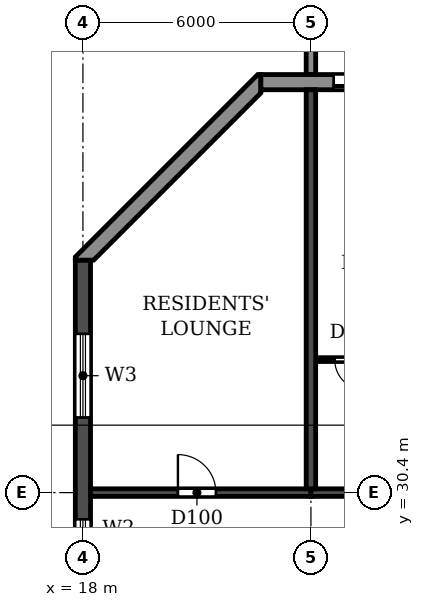
"""IFC4 building model, lengths in metres.
Left out: names, types, materials, properties, quantities, classifications, styles, units other than length and angle.
Written with IfcOpenShell. Run it as: python <this file> out.ifc"""

import sys

from ifc_helpers import new_model, si_unit, direction, frame, frame_2d, origin, place, context, subcontext, project, spatial, polyline, rectangle, outline, extrude, source, transform, mapped, element, fill, save


model = new_model("IFC4")
c1 = context("Model", 3, precision=1e-05, world=origin(), true_north=direction((0.0, 1.0)))
c2 = subcontext(c1, "Body", "Model", "MODEL_VIEW")
j1 = project(units=[si_unit("LENGTHUNIT", "METRE"), si_unit("PLANEANGLEUNIT", "RADIAN")], contexts=[c1])
p1 = place(None, origin())
s1 = spatial("IfcSite", under=j1, at=p1, CompositionType="ELEMENT")
p2 = place(p1, origin())
s2 = spatial("IfcBuilding", under=s1, at=p2, CompositionType="ELEMENT")
p3 = place(p2, frame((0.0, 0.0, 241.2)))
s3 = spatial("IfcBuildingStorey", under=s2, at=p3, CompositionType="ELEMENT", Elevation=241.2)
p4 = place(p3, frame((24.0, 30.5, 0.0), z_axis=(0.0, 0.0, 1.0), x_axis=(0.0, 1.0, 0.0)))
e1 = element("IfcWall", 1, at=p4, inside=s3, PredefinedType="SHEAR", context=c2, shape_type="SweptSolid", body=[
    extrude(rectangle(XDim=10.5, YDim=0.25, at=frame_2d((5.25, 0.0))), origin(), (0.0, 0.0, 1.0), 3.08),
])
p5 = place(p3, frame((18.0, 4.683, 0.0), z_axis=(0.0, 0.0, 1.0), x_axis=(0.0, 1.0, 0.0)))
e2 = element("IfcWall", 2, at=p5, inside=s3, PredefinedType="SHEAR", context=c2, shape_type="SweptSolid", body=[
    extrude(rectangle(XDim=31.834, YDim=0.4, at=frame_2d((15.917, 0.0))), origin(), (0.0, 0.0, 1.0), 3.08),
])
p6 = place(p5, frame((23.817, 0.0, 0.9)))
e3 = element("IfcOpeningElement", 3, at=p6, cuts=e2, PredefinedType="OPENING", context=c2, shape_type="SweptSolid", body=[
    extrude(rectangle(XDim=1.2, YDim=1.5, at=frame_2d((0.6, 0.75))), frame((0.0, 0.21, 0.0), z_axis=(0.0, -1.0, 0.0), x_axis=(1.0, 0.0, 0.0)), (0.0, 0.0, 1.0), 0.42),
])
p7 = place(p5, frame((8.017, 0.0, 0.9)))
e4 = element("IfcOpeningElement", 4, at=p7, cuts=e2, PredefinedType="OPENING", context=c2, shape_type="SweptSolid", body=[
    extrude(rectangle(XDim=1.2, YDim=1.5, at=frame_2d((0.6, 0.75))), frame((0.0, 0.21, 0.0), z_axis=(0.0, -1.0, 0.0), x_axis=(1.0, 0.0, 0.0)), (0.0, 0.0, 1.0), 0.42),
])
p8 = place(p5, frame((27.694, 0.0, 0.6)))
e5 = element("IfcOpeningElement", 5, at=p8, cuts=e2, PredefinedType="OPENING", context=c2, shape_type="SweptSolid", body=[
    extrude(rectangle(XDim=2.2, YDim=1.8, at=frame_2d((1.1, 0.9))), frame((0.0, 0.21, 0.0), z_axis=(0.0, -1.0, 0.0), x_axis=(1.0, 0.0, 0.0)), (0.0, 0.0, 1.0), 0.42),
])
p9 = place(p5, frame((2.541, 0.0, 0.6)))
e6 = element("IfcOpeningElement", 6, at=p9, cuts=e2, PredefinedType="OPENING", context=c2, shape_type="SweptSolid", body=[
    extrude(rectangle(XDim=2.2, YDim=1.8, at=frame_2d((1.1, 0.9))), frame((0.0, 0.21, 0.0), z_axis=(0.0, -1.0, 0.0), x_axis=(1.0, 0.0, 0.0)), (0.0, 0.0, 1.0), 0.42),
])
p10 = place(p5, frame((15.917, 0.0, 0.9)))
e7 = element("IfcOpeningElement", 7, at=p10, cuts=e2, PredefinedType="OPENING", context=c2, shape_type="SweptSolid", body=[
    extrude(rectangle(XDim=1.2, YDim=1.5, at=frame_2d((0.6, 0.75))), frame((0.0, 0.21, 0.0), z_axis=(0.0, -1.0, 0.0), x_axis=(1.0, 0.0, 0.0)), (0.0, 0.0, 1.0), 0.42),
])
p11 = place(p3, frame((18.2, 30.4, 0.0), z_axis=(0.0, 0.0, 1.0), x_axis=(1.0, 0.0, 0.0)))
e8 = element("IfcWall", 8, at=p11, inside=s3, PredefinedType="SHEAR", context=c2, shape_type="SweptSolid", body=[
    extrude(rectangle(XDim=5.8, YDim=0.2, at=frame_2d((2.9, 0.0))), origin(), (0.0, 0.0, 1.0), 2.48),
])
p12 = place(p11, frame((2.3, 0.0, 0.0)))
e9 = element("IfcOpeningElement", 9, at=p12, cuts=e8, PredefinedType="OPENING", context=c2, shape_type="SweptSolid", body=[
    extrude(rectangle(XDim=1.0, YDim=2.1, at=frame_2d((0.5, 1.05))), frame((0.0, 0.11, 0.0), z_axis=(0.0, -1.0, 0.0), x_axis=(1.0, 0.0, 0.0)), (0.0, 0.0, 1.0), 0.22),
])
p13 = place(p3, frame((24.0, 30.4, 0.0), z_axis=(0.0, 0.0, 1.0), x_axis=(1.0, 0.0, 0.0)))
e10 = element("IfcWall", 10, at=p13, inside=s3, PredefinedType="SHEAR", context=c2, shape_type="SweptSolid", body=[
    extrude(rectangle(XDim=6.0, YDim=0.2, at=frame_2d((3.0, 0.0))), origin(), (0.0, 0.0, 1.0), 2.48),
])
p14 = place(p13, frame((2.45, 0.0, 0.0)))
e11 = element("IfcOpeningElement", 11, at=p14, cuts=e10, PredefinedType="OPENING", context=c2, shape_type="SweptSolid", body=[
    extrude(rectangle(XDim=1.0, YDim=2.1, at=frame_2d((0.5, 1.05))), frame((0.0, 0.11, 0.0), z_axis=(0.0, -1.0, 0.0), x_axis=(1.0, 0.0, 0.0)), (0.0, 0.0, 1.0), 0.22),
])
p15 = place(p3, frame((79.317, 41.2, 0.0), z_axis=(0.0, 0.0, 1.0), x_axis=(-1.0, 0.0, 0.0)))
e12 = element("IfcWall", 12, at=p15, inside=s3, PredefinedType="STANDARD", context=c2, shape_type="SweptSolid", body=[
    extrude(rectangle(XDim=56.634, YDim=0.4, at=frame_2d((28.317, 0.0))), origin(), (0.0, 0.0, 1.0), 3.08),
])
p16 = place(p15, frame((52.917, 0.0, 0.0)))
e13 = element("IfcOpeningElement", 13, at=p16, cuts=e12, PredefinedType="OPENING", context=c2, shape_type="SweptSolid", body=[
    extrude(rectangle(XDim=1.8, YDim=2.4, at=frame_2d((0.9, 1.2))), frame((0.0, 0.21, 0.0), z_axis=(0.0, -1.0, 0.0), x_axis=(1.0, 0.0, 0.0)), (0.0, 0.0, 1.0), 0.42),
])
p17 = place(p15, frame((49.717, 0.0, 0.9)))
e14 = element("IfcOpeningElement", 14, at=p17, cuts=e12, PredefinedType="OPENING", context=c2, shape_type="SweptSolid", body=[
    extrude(rectangle(XDim=2.2, YDim=1.5, at=frame_2d((1.1, 0.75))), frame((0.0, 0.21, 0.0), z_axis=(0.0, -1.0, 0.0), x_axis=(1.0, 0.0, 0.0)), (0.0, 0.0, 1.0), 0.42),
])
p18 = place(p15, frame((46.717, 0.0, 0.9)))
e15 = element("IfcOpeningElement", 15, at=p18, cuts=e12, PredefinedType="OPENING", context=c2, shape_type="SweptSolid", body=[
    extrude(rectangle(XDim=2.2, YDim=1.5, at=frame_2d((1.1, 0.75))), frame((0.0, 0.21, 0.0), z_axis=(0.0, -1.0, 0.0), x_axis=(1.0, 0.0, 0.0)), (0.0, 0.0, 1.0), 0.42),
])
p19 = place(p15, frame((43.717, 0.0, 0.9)))
e16 = element("IfcOpeningElement", 16, at=p19, cuts=e12, PredefinedType="OPENING", context=c2, shape_type="SweptSolid", body=[
    extrude(rectangle(XDim=2.2, YDim=1.5, at=frame_2d((1.1, 0.75))), frame((0.0, 0.21, 0.0), z_axis=(0.0, -1.0, 0.0), x_axis=(1.0, 0.0, 0.0)), (0.0, 0.0, 1.0), 0.42),
])
p20 = place(p15, frame((40.917, 0.0, 0.0)))
e17 = element("IfcOpeningElement", 17, at=p20, cuts=e12, PredefinedType="OPENING", context=c2, shape_type="SweptSolid", body=[
    extrude(rectangle(XDim=1.8, YDim=2.4, at=frame_2d((0.9, 1.2))), frame((0.0, 0.21, 0.0), z_axis=(0.0, -1.0, 0.0), x_axis=(1.0, 0.0, 0.0)), (0.0, 0.0, 1.0), 0.42),
])
p21 = place(p15, frame((37.717, 0.0, 0.9)))
e18 = element("IfcOpeningElement", 18, at=p21, cuts=e12, PredefinedType="OPENING", context=c2, shape_type="SweptSolid", body=[
    extrude(rectangle(XDim=2.2, YDim=1.5, at=frame_2d((1.1, 0.75))), frame((0.0, 0.21, 0.0), z_axis=(0.0, -1.0, 0.0), x_axis=(1.0, 0.0, 0.0)), (0.0, 0.0, 1.0), 0.42),
])
p22 = place(p15, frame((34.717, 0.0, 0.9)))
e19 = element("IfcOpeningElement", 19, at=p22, cuts=e12, PredefinedType="OPENING", context=c2, shape_type="SweptSolid", body=[
    extrude(rectangle(XDim=2.2, YDim=1.5, at=frame_2d((1.1, 0.75))), frame((0.0, 0.21, 0.0), z_axis=(0.0, -1.0, 0.0), x_axis=(1.0, 0.0, 0.0)), (0.0, 0.0, 1.0), 0.42),
])
p23 = place(p15, frame((31.717, 0.0, 0.9)))
e20 = element("IfcOpeningElement", 20, at=p23, cuts=e12, PredefinedType="OPENING", context=c2, shape_type="SweptSolid", body=[
    extrude(rectangle(XDim=2.2, YDim=1.5, at=frame_2d((1.1, 0.75))), frame((0.0, 0.21, 0.0), z_axis=(0.0, -1.0, 0.0), x_axis=(1.0, 0.0, 0.0)), (0.0, 0.0, 1.0), 0.42),
])
p24 = place(p15, frame((28.717, 0.0, 0.9)))
e21 = element("IfcOpeningElement", 21, at=p24, cuts=e12, PredefinedType="OPENING", context=c2, shape_type="SweptSolid", body=[
    extrude(rectangle(XDim=2.2, YDim=1.5, at=frame_2d((1.1, 0.75))), frame((0.0, 0.21, 0.0), z_axis=(0.0, -1.0, 0.0), x_axis=(1.0, 0.0, 0.0)), (0.0, 0.0, 1.0), 0.42),
])
p25 = place(p15, frame((25.917, 0.0, 0.0)))
e22 = element("IfcOpeningElement", 22, at=p25, cuts=e12, PredefinedType="OPENING", context=c2, shape_type="SweptSolid", body=[
    extrude(rectangle(XDim=1.8, YDim=2.4, at=frame_2d((0.9, 1.2))), frame((0.0, 0.21, 0.0), z_axis=(0.0, -1.0, 0.0), x_axis=(1.0, 0.0, 0.0)), (0.0, 0.0, 1.0), 0.42),
])
p26 = place(p15, frame((22.717, 0.0, 0.9)))
e23 = element("IfcOpeningElement", 23, at=p26, cuts=e12, PredefinedType="OPENING", context=c2, shape_type="SweptSolid", body=[
    extrude(rectangle(XDim=2.2, YDim=1.5, at=frame_2d((1.1, 0.75))), frame((0.0, 0.21, 0.0), z_axis=(0.0, -1.0, 0.0), x_axis=(1.0, 0.0, 0.0)), (0.0, 0.0, 1.0), 0.42),
])
p27 = place(p15, frame((19.717, 0.0, 0.9)))
e24 = element("IfcOpeningElement", 24, at=p27, cuts=e12, PredefinedType="OPENING", context=c2, shape_type="SweptSolid", body=[
    extrude(rectangle(XDim=2.2, YDim=1.5, at=frame_2d((1.1, 0.75))), frame((0.0, 0.21, 0.0), z_axis=(0.0, -1.0, 0.0), x_axis=(1.0, 0.0, 0.0)), (0.0, 0.0, 1.0), 0.42),
])
p28 = place(p15, frame((16.717, 0.0, 0.9)))
e25 = element("IfcOpeningElement", 25, at=p28, cuts=e12, PredefinedType="OPENING", context=c2, shape_type="SweptSolid", body=[
    extrude(rectangle(XDim=2.2, YDim=1.5, at=frame_2d((1.1, 0.75))), frame((0.0, 0.21, 0.0), z_axis=(0.0, -1.0, 0.0), x_axis=(1.0, 0.0, 0.0)), (0.0, 0.0, 1.0), 0.42),
])
p29 = place(p15, frame((13.917, 0.0, 0.0)))
e26 = element("IfcOpeningElement", 26, at=p29, cuts=e12, PredefinedType="OPENING", context=c2, shape_type="SweptSolid", body=[
    extrude(rectangle(XDim=1.8, YDim=2.4, at=frame_2d((0.9, 1.2))), frame((0.0, 0.21, 0.0), z_axis=(0.0, -1.0, 0.0), x_axis=(1.0, 0.0, 0.0)), (0.0, 0.0, 1.0), 0.42),
])
p30 = place(p15, frame((10.717, 0.0, 0.9)))
e27 = element("IfcOpeningElement", 27, at=p30, cuts=e12, PredefinedType="OPENING", context=c2, shape_type="SweptSolid", body=[
    extrude(rectangle(XDim=2.2, YDim=1.5, at=frame_2d((1.1, 0.75))), frame((0.0, 0.21, 0.0), z_axis=(0.0, -1.0, 0.0), x_axis=(1.0, 0.0, 0.0)), (0.0, 0.0, 1.0), 0.42),
])
p31 = place(p15, frame((7.917, 0.0, 0.0)))
e28 = element("IfcOpeningElement", 28, at=p31, cuts=e12, PredefinedType="OPENING", context=c2, shape_type="SweptSolid", body=[
    extrude(rectangle(XDim=1.8, YDim=2.4, at=frame_2d((0.9, 1.2))), frame((0.0, 0.21, 0.0), z_axis=(0.0, -1.0, 0.0), x_axis=(1.0, 0.0, 0.0)), (0.0, 0.0, 1.0), 0.42),
])
p32 = place(p15, frame((4.717, 0.0, 0.9)))
e29 = element("IfcOpeningElement", 29, at=p32, cuts=e12, PredefinedType="OPENING", context=c2, shape_type="SweptSolid", body=[
    extrude(rectangle(XDim=2.2, YDim=1.5, at=frame_2d((1.1, 0.75))), frame((0.0, 0.21, 0.0), z_axis=(0.0, -1.0, 0.0), x_axis=(1.0, 0.0, 0.0)), (0.0, 0.0, 1.0), 0.42),
])
p33 = place(p15, frame((1.917, 0.0, 0.0)))
e30 = element("IfcOpeningElement", 30, at=p33, cuts=e12, PredefinedType="OPENING", context=c2, shape_type="SweptSolid", body=[
    extrude(rectangle(XDim=1.8, YDim=2.4, at=frame_2d((0.9, 1.2))), frame((0.0, 0.21, 0.0), z_axis=(0.0, -1.0, 0.0), x_axis=(1.0, 0.0, 0.0)), (0.0, 0.0, 1.0), 0.42),
])
p34 = place(p3, origin())
e31 = element("IfcWall", 31, at=p34, inside=s3, PredefinedType="STANDARD", context=c2, shape_type="SweptSolid", body=[
    extrude(outline(polyline([(22.683, 41.4), (22.6, 41.4), (17.8, 36.6), (17.8, 36.517), (18.283, 36.517), (22.683, 40.917), (22.683, 41.4)])), origin(), (0.0, 0.0, 1.0), 3.08),
])
m1 = source(origin(), c2, "Body", "SweptSolid", [
    extrude(outline(polyline([(0.0, 0.0), (0.25, 0.0), (0.25, 3.1), (0.0, 3.1), (0.0, 0.0)])), origin(), (0.0, 0.0, 1.0), 3.1),
])
p35 = place(p3, frame((23.875, 41.4, 0.0)))
e32 = element("IfcWall", 32, at=p35, inside=s3, PredefinedType="STANDARD", context=c2, shape_type="MappedRepresentation", body=[
    mapped(m1, transform((0.0, 0.0, 0.0))),
])
p36 = place(p3, frame((24.135, 33.9, 0.0), z_axis=(0.0, 0.0, 1.0), x_axis=(1.0, 0.0, 0.0)))
e33 = element("IfcWall", 33, at=p36, inside=s3, PredefinedType="PARTITIONING", context=c2, shape_type="SweptSolid", body=[
    extrude(rectangle(XDim=1.965, YDim=0.1, at=frame_2d((0.982, 0.0))), origin(), (0.0, 0.0, 1.0), 3.08),
])
p37 = place(p36, frame((0.49, 0.0, 0.0)))
e34 = element("IfcOpeningElement", 34, at=p37, cuts=e33, PredefinedType="OPENING", context=c2, shape_type="SweptSolid", body=[
    extrude(rectangle(XDim=0.8, YDim=2.1, at=frame_2d((0.4, 1.05))), frame((0.0, 0.06, 0.0), z_axis=(0.0, -1.0, 0.0), x_axis=(1.0, 0.0, 0.0)), (0.0, 0.0, 1.0), 0.12),
])
p38 = place(p16, origin())
e35 = element("IfcDoor", 35, at=p38, inside=s3, OperationType="DOUBLE_DOOR_SLIDING", PredefinedType="DOOR", context=c2, shape_type="SweptSolid", body=[
    extrude(rectangle(XDim=1.8, YDim=2.4, at=frame_2d((0.9, 1.2))), frame((0.0, 0.025, 0.0), z_axis=(0.0, -1.0, 0.0), x_axis=(1.0, 0.0, 0.0)), (0.0, 0.0, 1.0), 0.05),
])
fill(e13, e35)
p39 = place(p6, origin())
e36 = element("IfcWindow", 36, at=p39, inside=s3, PartitioningType="SINGLE_PANEL", PredefinedType="WINDOW", context=c2, shape_type="SweptSolid", body=[
    extrude(rectangle(XDim=1.2, YDim=1.5, at=frame_2d((0.6, 0.75))), frame((0.0, 0.03, 0.0), z_axis=(0.0, -1.0, 0.0), x_axis=(1.0, 0.0, 0.0)), (0.0, 0.0, 1.0), 0.06),
])
fill(e3, e36)
p40 = place(p8, origin())
e37 = element("IfcWindow", 37, at=p40, inside=s3, PartitioningType="DOUBLE_PANEL_HORIZONTAL", PredefinedType="WINDOW", context=c2, shape_type="SweptSolid", body=[
    extrude(rectangle(XDim=2.2, YDim=1.8, at=frame_2d((1.1, 0.9))), frame((0.0, 0.03, 0.0), z_axis=(0.0, -1.0, 0.0), x_axis=(1.0, 0.0, 0.0)), (0.0, 0.0, 1.0), 0.06),
])
fill(e5, e37)
p41 = place(p12, origin())
e38 = element("IfcDoor", 38, at=p41, inside=s3, OperationType="SINGLE_SWING_LEFT", PredefinedType="DOOR", context=c2, shape_type="SweptSolid", body=[
    extrude(rectangle(XDim=1.0, YDim=2.1, at=frame_2d((0.5, 1.05))), frame((0.0, 0.025, 0.0), z_axis=(0.0, -1.0, 0.0), x_axis=(1.0, 0.0, 0.0)), (0.0, 0.0, 1.0), 0.05),
])
fill(e9, e38)
p42 = place(p37, frame((0.8, 0.0, 0.0), z_axis=(0.0, 0.0, 1.0), x_axis=(-1.0, 0.0, 0.0)))
e39 = element("IfcDoor", 39, at=p42, inside=s3, OperationType="SINGLE_SWING_LEFT", PredefinedType="DOOR", context=c2, shape_type="SweptSolid", body=[
    extrude(rectangle(XDim=0.8, YDim=2.1, at=frame_2d((0.4, 1.05))), frame((0.0, 0.025, 0.0), z_axis=(0.0, -1.0, 0.0), x_axis=(1.0, 0.0, 0.0)), (0.0, 0.0, 1.0), 0.05),
])
fill(e34, e39)
save(model, sys.argv[1])
